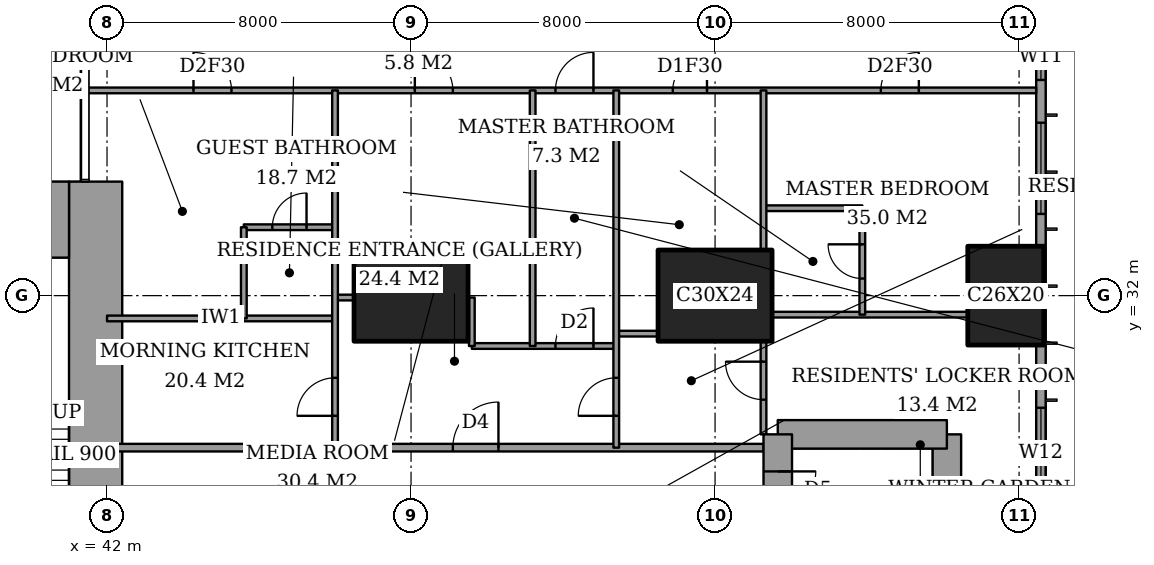
"""IFC4 building model, lengths in metres.
Left out: names, types, materials, properties, quantities, classifications, styles, units other than length and angle.
Written with IfcOpenShell. Run it as: python <this file> out.ifc"""

import sys

from ifc_helpers import new_model, si_unit, direction, frame, frame_2d, origin, origin_2d, place, context, subcontext, project, spatial, rectangle, extrude, element, fill, save


model = new_model("IFC4")
c1 = context("Model", 3, precision=1e-05, world=origin(), true_north=direction((0.0, 1.0)))
c2 = subcontext(c1, "Body", "Model", "MODEL_VIEW")
j1 = project(units=[si_unit("LENGTHUNIT", "METRE"), si_unit("PLANEANGLEUNIT", "RADIAN")], contexts=[c1])
p1 = place(None, origin())
s1 = spatial("IfcSite", under=j1, at=p1, CompositionType="ELEMENT")
p2 = place(p1, origin())
s2 = spatial("IfcBuilding", under=s1, at=p2, CompositionType="ELEMENT")
p3 = place(p2, frame((0.0, 0.0, 139.4)))
s3 = spatial("IfcBuildingStorey", under=s2, at=p3, CompositionType="ELEMENT", Elevation=139.4)
for number, where, z_axis, x_axis in (
    (1, (50.0, 32.0, 0.0), (0.0, 0.0, 1.0), (1.0, 0.0, 0.0)),
    (2, (58.0, 32.0, 0.0), (0.0, 0.0, 1.0), (1.0, 0.0, 0.0)),
):
    element("IfcColumn", number, at=place(p3, frame(where, z_axis=z_axis, x_axis=x_axis)), inside=s3, PredefinedType="COLUMN", context=c2, shape_type="SweptSolid", body=[
        extrude(rectangle(XDim=3.0, YDim=2.4, at=origin_2d()), origin(), (0.0, 0.0, 1.0), 3.6),
    ])
p4 = place(p3, frame((65.65, 32.0, 0.0), z_axis=(0.0, 0.0, 1.0), x_axis=(0.0, 1.0, 0.0)))
e3 = element("IfcColumn", 3, at=p4, inside=s3, PredefinedType="COLUMN", context=c2, shape_type="SweptSolid", body=[
    extrude(rectangle(XDim=2.6, YDim=2.0, at=origin_2d()), origin(), (0.0, 0.0, 1.0), 3.6),
])
p5 = place(p3, frame((37.85, 34.0, 0.0), z_axis=(0.0, 0.0, 1.0), x_axis=(1.0, 0.0, 0.0)))
e4 = element("IfcWall", 4, at=p5, inside=s3, PredefinedType="SHEAR", context=c2, shape_type="SweptSolid", body=[
    extrude(rectangle(XDim=3.15, YDim=2.0, at=frame_2d((1.575, 0.0))), origin(), (0.0, 0.0, 1.0), 3.6),
])
p6 = place(p3, frame((41.7, 24.85, 0.0), z_axis=(0.0, 0.0, 1.0), x_axis=(0.0, 1.0, 0.0)))
e5 = element("IfcWall", 5, at=p6, inside=s3, PredefinedType="SHEAR", context=c2, shape_type="SweptSolid", body=[
    extrude(rectangle(XDim=10.15, YDim=1.4, at=frame_2d((5.075, 0.0))), origin(), (0.0, 0.0, 1.0), 3.6),
])
p7 = place(p3, frame((64.1, 19.65, 0.0), z_axis=(0.0, 0.0, 1.0), x_axis=(0.0, 1.0, 0.0)))
e6 = element("IfcWall", 6, at=p7, inside=s3, PredefinedType="SHEAR", context=c2, shape_type="SweptSolid", body=[
    extrude(rectangle(XDim=8.7, YDim=0.75, at=frame_2d((4.35, 0.0))), origin(), (0.0, 0.0, 1.0), 3.6),
])
p8 = place(p3, frame((64.1, 28.35, 0.0), z_axis=(0.0, 0.0, 1.0), x_axis=(-1.0, 0.0, 0.0)))
e7 = element("IfcWall", 7, at=p8, inside=s3, PredefinedType="SHEAR", context=c2, shape_type="SweptSolid", body=[
    extrude(rectangle(XDim=4.45, YDim=0.75, at=frame_2d((2.225, 0.0))), origin(), (0.0, 0.0, 1.0), 3.6),
])
p9 = place(p3, frame((59.65, 28.35, 0.0), z_axis=(0.0, 0.0, 1.0), x_axis=(0.0, -1.0, 0.0)))
e8 = element("IfcWall", 8, at=p9, inside=s3, PredefinedType="SHEAR", context=c2, shape_type="SweptSolid", body=[
    extrude(rectangle(XDim=8.7, YDim=0.75, at=frame_2d((4.35, 0.0))), origin(), (0.0, 0.0, 1.0), 3.6),
])
p10 = place(p9, frame((0.975, 0.0, 0.0)))
e9 = element("IfcOpeningElement", 9, at=p10, cuts=e8, PredefinedType="OPENING", context=c2, shape_type="SweptSolid", body=[
    extrude(rectangle(XDim=1.0, YDim=2.1, at=frame_2d((0.5, 1.05))), frame((0.0, 0.385, 0.0), z_axis=(0.0, -1.0, 0.0), x_axis=(1.0, 0.0, 0.0)), (0.0, 0.0, 1.0), 0.77),
])
p11 = place(p3, frame((66.575, 3.175, 0.0), z_axis=(0.0, 0.0, 1.0), x_axis=(0.0, 1.0, 0.0)))
e10 = element("IfcWall", 10, at=p11, inside=s3, PredefinedType="SOLIDWALL", context=c2, shape_type="SweptSolid", body=[
    extrude(rectangle(XDim=41.65, YDim=0.25, at=frame_2d((20.825, 0.0))), origin(), (0.0, 0.0, 1.0), 3.6),
])
p12 = place(p11, frame((0.775, 0.0, 0.4)))
e11 = element("IfcOpeningElement", 11, at=p12, cuts=e10, PredefinedType="OPENING", context=c2, shape_type="SweptSolid", body=[
    extrude(rectangle(XDim=2.4, YDim=2.2, at=frame_2d((1.2, 1.1))), frame((0.0, 0.135, 0.0), z_axis=(0.0, -1.0, 0.0), x_axis=(1.0, 0.0, 0.0)), (0.0, 0.0, 1.0), 0.27),
])
p13 = place(p11, frame((6.1, 0.0, 0.4)))
e12 = element("IfcOpeningElement", 12, at=p13, cuts=e10, PredefinedType="OPENING", context=c2, shape_type="SweptSolid", body=[
    extrude(rectangle(XDim=1.2, YDim=2.2, at=frame_2d((0.6, 1.1))), frame((0.0, 0.135, 0.0), z_axis=(0.0, -1.0, 0.0), x_axis=(1.0, 0.0, 0.0)), (0.0, 0.0, 1.0), 0.27),
])
p14 = place(p11, frame((8.275, 0.0, 0.4)))
e13 = element("IfcOpeningElement", 13, at=p14, cuts=e10, PredefinedType="OPENING", context=c2, shape_type="SweptSolid", body=[
    extrude(rectangle(XDim=2.4, YDim=2.2, at=frame_2d((1.2, 1.1))), frame((0.0, 0.135, 0.0), z_axis=(0.0, -1.0, 0.0), x_axis=(1.0, 0.0, 0.0)), (0.0, 0.0, 1.0), 0.27),
])
p15 = place(p11, frame((15.775, 0.0, 0.4)))
e14 = element("IfcOpeningElement", 14, at=p15, cuts=e10, PredefinedType="OPENING", context=c2, shape_type="SweptSolid", body=[
    extrude(rectangle(XDim=2.4, YDim=2.2, at=frame_2d((1.2, 1.1))), frame((0.0, 0.135, 0.0), z_axis=(0.0, -1.0, 0.0), x_axis=(1.0, 0.0, 0.0)), (0.0, 0.0, 1.0), 0.27),
])
p16 = place(p11, frame((23.475, 0.0, 0.4)))
e15 = element("IfcOpeningElement", 15, at=p16, cuts=e10, PredefinedType="OPENING", context=c2, shape_type="SweptSolid", body=[
    extrude(rectangle(XDim=2.4, YDim=2.2, at=frame_2d((1.2, 1.1))), frame((0.0, 0.135, 0.0), z_axis=(0.0, -1.0, 0.0), x_axis=(1.0, 0.0, 0.0)), (0.0, 0.0, 1.0), 0.27),
])
p17 = place(p11, frame((30.975, 0.0, 0.4)))
e16 = element("IfcOpeningElement", 16, at=p17, cuts=e10, PredefinedType="OPENING", context=c2, shape_type="SweptSolid", body=[
    extrude(rectangle(XDim=2.4, YDim=2.2, at=frame_2d((1.2, 1.1))), frame((0.0, 0.135, 0.0), z_axis=(0.0, -1.0, 0.0), x_axis=(1.0, 0.0, 0.0)), (0.0, 0.0, 1.0), 0.27),
])
p18 = place(p11, frame((34.5, 0.0, 0.4)))
e17 = element("IfcOpeningElement", 17, at=p18, cuts=e10, PredefinedType="OPENING", context=c2, shape_type="SweptSolid", body=[
    extrude(rectangle(XDim=1.2, YDim=2.2, at=frame_2d((0.6, 1.1))), frame((0.0, 0.135, 0.0), z_axis=(0.0, -1.0, 0.0), x_axis=(1.0, 0.0, 0.0)), (0.0, 0.0, 1.0), 0.27),
])
p19 = place(p11, frame((38.475, 0.0, 0.4)))
e18 = element("IfcOpeningElement", 18, at=p19, cuts=e10, PredefinedType="OPENING", context=c2, shape_type="SweptSolid", body=[
    extrude(rectangle(XDim=2.4, YDim=2.2, at=frame_2d((1.2, 1.1))), frame((0.0, 0.135, 0.0), z_axis=(0.0, -1.0, 0.0), x_axis=(1.0, 0.0, 0.0)), (0.0, 0.0, 1.0), 0.27),
])
p20 = place(p3, frame((42.0, 28.0, 0.0), z_axis=(0.0, 0.0, 1.0), x_axis=(1.0, 0.0, 0.0)))
e19 = element("IfcWall", 19, at=p20, inside=s3, PredefinedType="PARTITIONING", context=c2, shape_type="SweptSolid", body=[
    extrude(rectangle(XDim=17.275, YDim=0.2, at=frame_2d((8.637, 0.0))), origin(), (0.0, 0.0, 1.0), 3.35),
])
p21 = place(p20, frame((9.1, 0.0, 0.0)))
e20 = element("IfcOpeningElement", 20, at=p21, cuts=e19, PredefinedType="OPENING", context=c2, shape_type="SweptSolid", body=[
    extrude(rectangle(XDim=1.2, YDim=2.4, at=frame_2d((0.6, 1.2))), frame((0.0, 0.11, 0.0), z_axis=(0.0, -1.0, 0.0), x_axis=(1.0, 0.0, 0.0)), (0.0, 0.0, 1.0), 0.22),
])
p22 = place(p3, frame((51.6, 30.675, 0.0), z_axis=(0.0, 0.0, 1.0), x_axis=(1.0, 0.0, 0.0)))
e21 = element("IfcWall", 21, at=p22, inside=s3, PredefinedType="PARTITIONING", context=c2, shape_type="SweptSolid", body=[
    extrude(rectangle(XDim=3.8, YDim=0.15, at=frame_2d((1.9, 0.0))), origin(), (0.0, 0.0, 1.0), 3.35),
])
p23 = place(p22, frame((2.2, 0.0, 0.0)))
e22 = element("IfcOpeningElement", 22, at=p23, cuts=e21, PredefinedType="OPENING", context=c2, shape_type="SweptSolid", body=[
    extrude(rectangle(XDim=1.0, YDim=2.1, at=frame_2d((0.5, 1.05))), frame((0.0, 0.085, 0.0), z_axis=(0.0, -1.0, 0.0), x_axis=(1.0, 0.0, 0.0)), (0.0, 0.0, 1.0), 0.17),
])
p24 = place(p3, frame((55.4, 31.0, 0.0), z_axis=(0.0, 0.0, 1.0), x_axis=(1.0, 0.0, 0.0)))
e23 = element("IfcWall", 23, at=p24, inside=s3, PredefinedType="PARTITIONING", context=c2, shape_type="SweptSolid", body=[
    extrude(rectangle(XDim=1.1, YDim=0.15, at=frame_2d((0.55, 0.0))), origin(), (0.0, 0.0, 1.0), 3.35),
])
p25 = place(p3, frame((42.0, 31.4, 0.0), z_axis=(0.0, 0.0, 1.0), x_axis=(1.0, 0.0, 0.0)))
e24 = element("IfcWall", 24, at=p25, inside=s3, PredefinedType="PARTITIONING", context=c2, shape_type="SweptSolid", body=[
    extrude(rectangle(XDim=6.0, YDim=0.15, at=frame_2d((3.0, 0.0))), origin(), (0.0, 0.0, 1.0), 3.35),
])
p26 = place(p3, frame((59.5, 31.5, 0.0), z_axis=(0.0, 0.0, 1.0), x_axis=(1.0, 0.0, 0.0)))
e25 = element("IfcWall", 25, at=p26, inside=s3, PredefinedType="PARTITIONING", context=c2, shape_type="SweptSolid", body=[
    extrude(rectangle(XDim=5.15, YDim=0.15, at=frame_2d((2.575, 0.0))), origin(), (0.0, 0.0, 1.0), 3.35),
])
p27 = place(p3, frame((48.0, 31.95, 0.0), z_axis=(0.0, 0.0, 1.0), x_axis=(1.0, 0.0, 0.0)))
e26 = element("IfcWall", 26, at=p27, inside=s3, PredefinedType="PARTITIONING", context=c2, shape_type="SweptSolid", body=[
    extrude(rectangle(XDim=0.5, YDim=0.15, at=frame_2d((0.25, 0.0))), origin(), (0.0, 0.0, 1.0), 2.634),
])
p28 = place(p3, frame((45.6, 33.8, 0.0), z_axis=(0.0, 0.0, 1.0), x_axis=(1.0, 0.0, 0.0)))
e27 = element("IfcWall", 27, at=p28, inside=s3, PredefinedType="PARTITIONING", context=c2, shape_type="SweptSolid", body=[
    extrude(rectangle(XDim=2.4, YDim=0.15, at=frame_2d((1.2, 0.0))), origin(), (0.0, 0.0, 1.0), 3.35),
])
p29 = place(p28, frame((0.75, 0.0, 0.0)))
e28 = element("IfcOpeningElement", 28, at=p29, cuts=e27, PredefinedType="OPENING", context=c2, shape_type="SweptSolid", body=[
    extrude(rectangle(XDim=0.9, YDim=2.1, at=frame_2d((0.45, 1.05))), frame((0.0, 0.085, 0.0), z_axis=(0.0, -1.0, 0.0), x_axis=(1.0, 0.0, 0.0)), (0.0, 0.0, 1.0), 0.17),
])
p30 = place(p3, frame((59.275, 34.3, 0.0), z_axis=(0.0, 0.0, 1.0), x_axis=(1.0, 0.0, 0.0)))
e29 = element("IfcWall", 29, at=p30, inside=s3, PredefinedType="PARTITIONING", context=c2, shape_type="SweptSolid", body=[
    extrude(rectangle(XDim=2.6, YDim=0.15, at=frame_2d((1.3, 0.0))), origin(), (0.0, 0.0, 1.0), 3.35),
])
p31 = place(p3, frame((41.439, 37.4, 0.0), z_axis=(0.0, 0.0, 1.0), x_axis=(1.0, 0.0, 0.0)))
e30 = element("IfcWall", 30, at=p31, inside=s3, PredefinedType="PARTITIONING", context=c2, shape_type="SweptSolid", body=[
    extrude(rectangle(XDim=25.011, YDim=0.15, at=frame_2d((12.505, 0.0))), origin(), (0.0, 0.0, 1.0), 3.35),
])
p32 = place(p31, frame((12.361, 0.0, 0.0)))
e31 = element("IfcOpeningElement", 31, at=p32, cuts=e30, PredefinedType="OPENING", context=c2, shape_type="SweptSolid", body=[
    extrude(rectangle(XDim=1.0, YDim=2.1, at=frame_2d((0.5, 1.05))), frame((0.0, 0.085, 0.0), z_axis=(0.0, -1.0, 0.0), x_axis=(1.0, 0.0, 0.0)), (0.0, 0.0, 1.0), 0.17),
])
p33 = place(p31, frame((20.924, 0.0, 0.0)))
e32 = element("IfcOpeningElement", 32, at=p33, cuts=e30, PredefinedType="OPENING", context=c2, shape_type="SweptSolid", body=[
    extrude(rectangle(XDim=1.0, YDim=2.1, at=frame_2d((0.5, 1.05))), frame((0.0, 0.085, 0.0), z_axis=(0.0, -1.0, 0.0), x_axis=(1.0, 0.0, 0.0)), (0.0, 0.0, 1.0), 0.17),
])
p34 = place(p31, frame((15.448, 0.0, 0.0)))
e33 = element("IfcOpeningElement", 33, at=p34, cuts=e30, PredefinedType="OPENING", context=c2, shape_type="SweptSolid", body=[
    extrude(rectangle(XDim=0.9, YDim=2.1, at=frame_2d((0.45, 1.05))), frame((0.0, 0.085, 0.0), z_axis=(0.0, -1.0, 0.0), x_axis=(1.0, 0.0, 0.0)), (0.0, 0.0, 1.0), 0.17),
])
p35 = place(p31, frame((8.661, 0.0, 0.0)))
e34 = element("IfcOpeningElement", 34, at=p35, cuts=e30, PredefinedType="OPENING", context=c2, shape_type="SweptSolid", body=[
    extrude(rectangle(XDim=1.0, YDim=2.1, at=frame_2d((0.5, 1.05))), frame((0.0, 0.085, 0.0), z_axis=(0.0, -1.0, 0.0), x_axis=(1.0, 0.0, 0.0)), (0.0, 0.0, 1.0), 0.17),
])
p36 = place(p31, frame((2.836, 0.0, 0.0)))
e35 = element("IfcOpeningElement", 35, at=p36, cuts=e30, PredefinedType="OPENING", context=c2, shape_type="SweptSolid", body=[
    extrude(rectangle(XDim=1.0, YDim=2.1, at=frame_2d((0.5, 1.05))), frame((0.0, 0.085, 0.0), z_axis=(0.0, -1.0, 0.0), x_axis=(1.0, 0.0, 0.0)), (0.0, 0.0, 1.0), 0.17),
])
p37 = place(p3, frame((45.6, 31.4, 0.0), z_axis=(0.0, 0.0, 1.0), x_axis=(0.0, 1.0, 0.0)))
e36 = element("IfcWall", 36, at=p37, inside=s3, PredefinedType="PARTITIONING", context=c2, shape_type="SweptSolid", body=[
    extrude(rectangle(XDim=2.4, YDim=0.15, at=frame_2d((1.2, 0.0))), origin(), (0.0, 0.0, 1.0), 3.35),
])
p38 = place(p3, frame((48.0, 28.0, 0.0), z_axis=(0.0, 0.0, 1.0), x_axis=(0.0, 1.0, 0.0)))
e37 = element("IfcWall", 37, at=p38, inside=s3, PredefinedType="PARTITIONING", context=c2, shape_type="SweptSolid", body=[
    extrude(rectangle(XDim=9.4, YDim=0.15, at=frame_2d((4.7, 0.0))), origin(), (0.0, 0.0, 1.0), 3.35),
])
p39 = place(p38, frame((0.837, 0.0, 0.0)))
e38 = element("IfcOpeningElement", 38, at=p39, cuts=e37, PredefinedType="OPENING", context=c2, shape_type="SweptSolid", body=[
    extrude(rectangle(XDim=1.0, YDim=2.1, at=frame_2d((0.5, 1.05))), frame((0.0, 0.085, 0.0), z_axis=(0.0, -1.0, 0.0), x_axis=(1.0, 0.0, 0.0)), (0.0, 0.0, 1.0), 0.17),
])
p40 = place(p3, frame((51.6, 30.675, 0.0), z_axis=(0.0, 0.0, 1.0), x_axis=(0.0, 1.0, 0.0)))
e39 = element("IfcWall", 39, at=p40, inside=s3, PredefinedType="PARTITIONING", context=c2, shape_type="SweptSolid", body=[
    extrude(rectangle(XDim=1.275, YDim=0.15, at=frame_2d((0.637, 0.0))), origin(), (0.0, 0.0, 1.0), 3.35),
])
p41 = place(p3, frame((53.2, 30.675, 0.0), z_axis=(0.0, 0.0, 1.0), x_axis=(0.0, 1.0, 0.0)))
e40 = element("IfcWall", 40, at=p41, inside=s3, PredefinedType="PARTITIONING", context=c2, shape_type="SweptSolid", body=[
    extrude(rectangle(XDim=6.725, YDim=0.15, at=frame_2d((3.362, 0.0))), origin(), (0.0, 0.0, 1.0), 3.35),
])
p42 = place(p3, frame((55.4, 28.0, 0.0), z_axis=(0.0, 0.0, 1.0), x_axis=(0.0, 1.0, 0.0)))
e41 = element("IfcWall", 41, at=p42, inside=s3, PredefinedType="PARTITIONING", context=c2, shape_type="SweptSolid", body=[
    extrude(rectangle(XDim=9.4, YDim=0.15, at=frame_2d((4.7, 0.0))), origin(), (0.0, 0.0, 1.0), 3.35),
])
p43 = place(p42, frame((0.837, 0.0, 0.0)))
e42 = element("IfcOpeningElement", 42, at=p43, cuts=e41, PredefinedType="OPENING", context=c2, shape_type="SweptSolid", body=[
    extrude(rectangle(XDim=1.0, YDim=2.1, at=frame_2d((0.5, 1.05))), frame((0.0, 0.085, 0.0), z_axis=(0.0, -1.0, 0.0), x_axis=(1.0, 0.0, 0.0)), (0.0, 0.0, 1.0), 0.17),
])
p44 = place(p3, frame((59.275, 28.35, 0.0), z_axis=(0.0, 0.0, 1.0), x_axis=(0.0, 1.0, 0.0)))
e43 = element("IfcWall", 43, at=p44, inside=s3, PredefinedType="PARTITIONING", context=c2, shape_type="SweptSolid", body=[
    extrude(rectangle(XDim=2.45, YDim=0.15, at=frame_2d((1.225, 0.0))), origin(), (0.0, 0.0, 1.0), 3.35),
])
p45 = place(p44, frame((0.913, 0.0, 0.0)))
e44 = element("IfcOpeningElement", 44, at=p45, cuts=e43, PredefinedType="OPENING", context=c2, shape_type="SweptSolid", body=[
    extrude(rectangle(XDim=1.0, YDim=2.1, at=frame_2d((0.5, 1.05))), frame((0.0, 0.085, 0.0), z_axis=(0.0, -1.0, 0.0), x_axis=(1.0, 0.0, 0.0)), (0.0, 0.0, 1.0), 0.17),
])
p46 = place(p3, frame((59.275, 33.2, 0.0), z_axis=(0.0, 0.0, 1.0), x_axis=(0.0, 1.0, 0.0)))
e45 = element("IfcWall", 45, at=p46, inside=s3, PredefinedType="PARTITIONING", context=c2, shape_type="SweptSolid", body=[
    extrude(rectangle(XDim=4.2, YDim=0.15, at=frame_2d((2.1, 0.0))), origin(), (0.0, 0.0, 1.0), 3.35),
])
p47 = place(p3, frame((61.875, 31.5, 0.0), z_axis=(0.0, 0.0, 1.0), x_axis=(0.0, 1.0, 0.0)))
e46 = element("IfcWall", 46, at=p47, inside=s3, PredefinedType="PARTITIONING", context=c2, shape_type="SweptSolid", body=[
    extrude(rectangle(XDim=2.8, YDim=0.15, at=frame_2d((1.4, 0.0))), origin(), (0.0, 0.0, 1.0), 3.35),
])
p48 = place(p47, frame((0.95, 0.0, 0.0)))
e47 = element("IfcOpeningElement", 47, at=p48, cuts=e46, PredefinedType="OPENING", context=c2, shape_type="SweptSolid", body=[
    extrude(rectangle(XDim=0.9, YDim=2.1, at=frame_2d((0.45, 1.05))), frame((0.0, 0.085, 0.0), z_axis=(0.0, -1.0, 0.0), x_axis=(1.0, 0.0, 0.0)), (0.0, 0.0, 1.0), 0.17),
])
p49 = place(p16, origin())
e48 = element("IfcWindow", 48, at=p49, inside=s3, PartitioningType="SINGLE_PANEL", PredefinedType="WINDOW", context=c2, shape_type="SweptSolid", body=[
    extrude(rectangle(XDim=2.4, YDim=2.2, at=frame_2d((1.2, 1.1))), frame((0.0, 0.03, 0.0), z_axis=(0.0, -1.0, 0.0), x_axis=(1.0, 0.0, 0.0)), (0.0, 0.0, 1.0), 0.06),
])
fill(e15, e48)
p50 = place(p17, origin())
e49 = element("IfcWindow", 49, at=p50, inside=s3, PartitioningType="SINGLE_PANEL", PredefinedType="WINDOW", context=c2, shape_type="SweptSolid", body=[
    extrude(rectangle(XDim=2.4, YDim=2.2, at=frame_2d((1.2, 1.1))), frame((0.0, 0.03, 0.0), z_axis=(0.0, -1.0, 0.0), x_axis=(1.0, 0.0, 0.0)), (0.0, 0.0, 1.0), 0.06),
])
fill(e16, e49)
p51 = place(p18, origin())
e50 = element("IfcWindow", 50, at=p51, inside=s3, PartitioningType="SINGLE_PANEL", PredefinedType="WINDOW", context=c2, shape_type="SweptSolid", body=[
    extrude(rectangle(XDim=1.2, YDim=2.2, at=frame_2d((0.6, 1.1))), frame((0.0, 0.03, 0.0), z_axis=(0.0, -1.0, 0.0), x_axis=(1.0, 0.0, 0.0)), (0.0, 0.0, 1.0), 0.06),
])
fill(e17, e50)
p52 = place(p32, origin())
e51 = element("IfcDoor", 51, at=p52, inside=s3, OperationType="SINGLE_SWING_LEFT", PredefinedType="DOOR", context=c2, shape_type="SweptSolid", body=[
    extrude(rectangle(XDim=1.0, YDim=2.1, at=frame_2d((0.5, 1.05))), frame((0.0, 0.025, 0.0), z_axis=(0.0, -1.0, 0.0), x_axis=(1.0, 0.0, 0.0)), (0.0, 0.0, 1.0), 0.05),
])
fill(e31, e51)
p53 = place(p48, origin())
e52 = element("IfcDoor", 52, at=p53, inside=s3, OperationType="SINGLE_SWING_LEFT", PredefinedType="DOOR", context=c2, shape_type="SweptSolid", body=[
    extrude(rectangle(XDim=0.9, YDim=2.1, at=frame_2d((0.45, 1.05))), frame((0.0, 0.025, 0.0), z_axis=(0.0, -1.0, 0.0), x_axis=(1.0, 0.0, 0.0)), (0.0, 0.0, 1.0), 0.05),
])
fill(e47, e52)
p54 = place(p33, origin())
e53 = element("IfcDoor", 53, at=p54, inside=s3, OperationType="SINGLE_SWING_LEFT", PredefinedType="DOOR", context=c2, shape_type="SweptSolid", body=[
    extrude(rectangle(XDim=1.0, YDim=2.1, at=frame_2d((0.5, 1.05))), frame((0.0, 0.025, 0.0), z_axis=(0.0, -1.0, 0.0), x_axis=(1.0, 0.0, 0.0)), (0.0, 0.0, 1.0), 0.05),
])
fill(e32, e53)
p55 = place(p45, origin())
e54 = element("IfcDoor", 54, at=p55, inside=s3, OperationType="SINGLE_SWING_LEFT", PredefinedType="DOOR", context=c2, shape_type="SweptSolid", body=[
    extrude(rectangle(XDim=1.0, YDim=2.1, at=frame_2d((0.5, 1.05))), frame((0.0, 0.025, 0.0), z_axis=(0.0, -1.0, 0.0), x_axis=(1.0, 0.0, 0.0)), (0.0, 0.0, 1.0), 0.05),
])
fill(e44, e54)
p56 = place(p34, origin())
e55 = element("IfcDoor", 55, at=p56, inside=s3, OperationType="SINGLE_SWING_LEFT", PredefinedType="DOOR", context=c2, shape_type="SweptSolid", body=[
    extrude(rectangle(XDim=0.9, YDim=2.1, at=frame_2d((0.45, 1.05))), frame((0.0, 0.025, 0.0), z_axis=(0.0, -1.0, 0.0), x_axis=(1.0, 0.0, 0.0)), (0.0, 0.0, 1.0), 0.05),
])
fill(e33, e55)
p57 = place(p43, origin())
e56 = element("IfcDoor", 56, at=p57, inside=s3, OperationType="SINGLE_SWING_RIGHT", PredefinedType="DOOR", context=c2, shape_type="SweptSolid", body=[
    extrude(rectangle(XDim=1.0, YDim=2.1, at=frame_2d((0.5, 1.05))), frame((0.0, 0.025, 0.0), z_axis=(0.0, -1.0, 0.0), x_axis=(1.0, 0.0, 0.0)), (0.0, 0.0, 1.0), 0.05),
])
fill(e42, e56)
p58 = place(p21, origin())
e57 = element("IfcDoor", 57, at=p58, inside=s3, OperationType="SINGLE_SWING_LEFT", PredefinedType="DOOR", context=c2, shape_type="SweptSolid", body=[
    extrude(rectangle(XDim=1.2, YDim=2.4, at=frame_2d((0.6, 1.2))), frame((0.0, 0.025, 0.0), z_axis=(0.0, -1.0, 0.0), x_axis=(1.0, 0.0, 0.0)), (0.0, 0.0, 1.0), 0.05),
])
fill(e20, e57)
p59 = place(p23, origin())
e58 = element("IfcDoor", 58, at=p59, inside=s3, OperationType="SINGLE_SWING_LEFT", PredefinedType="DOOR", context=c2, shape_type="SweptSolid", body=[
    extrude(rectangle(XDim=1.0, YDim=2.1, at=frame_2d((0.5, 1.05))), frame((0.0, 0.025, 0.0), z_axis=(0.0, -1.0, 0.0), x_axis=(1.0, 0.0, 0.0)), (0.0, 0.0, 1.0), 0.05),
])
fill(e22, e58)
p60 = place(p35, origin())
e59 = element("IfcDoor", 59, at=p60, inside=s3, OperationType="SINGLE_SWING_RIGHT", PredefinedType="DOOR", context=c2, shape_type="SweptSolid", body=[
    extrude(rectangle(XDim=1.0, YDim=2.1, at=frame_2d((0.5, 1.05))), frame((0.0, 0.025, 0.0), z_axis=(0.0, -1.0, 0.0), x_axis=(1.0, 0.0, 0.0)), (0.0, 0.0, 1.0), 0.05),
])
fill(e34, e59)
p61 = place(p29, origin())
e60 = element("IfcDoor", 60, at=p61, inside=s3, OperationType="SINGLE_SWING_LEFT", PredefinedType="DOOR", context=c2, shape_type="SweptSolid", body=[
    extrude(rectangle(XDim=0.9, YDim=2.1, at=frame_2d((0.45, 1.05))), frame((0.0, 0.025, 0.0), z_axis=(0.0, -1.0, 0.0), x_axis=(1.0, 0.0, 0.0)), (0.0, 0.0, 1.0), 0.05),
])
fill(e28, e60)
p62 = place(p36, origin())
e61 = element("IfcDoor", 61, at=p62, inside=s3, OperationType="SINGLE_SWING_RIGHT", PredefinedType="DOOR", context=c2, shape_type="SweptSolid", body=[
    extrude(rectangle(XDim=1.0, YDim=2.1, at=frame_2d((0.5, 1.05))), frame((0.0, 0.025, 0.0), z_axis=(0.0, -1.0, 0.0), x_axis=(1.0, 0.0, 0.0)), (0.0, 0.0, 1.0), 0.05),
])
fill(e35, e61)
p63 = place(p39, origin())
e62 = element("IfcDoor", 62, at=p63, inside=s3, OperationType="SINGLE_SWING_RIGHT", PredefinedType="DOOR", context=c2, shape_type="SweptSolid", body=[
    extrude(rectangle(XDim=1.0, YDim=2.1, at=frame_2d((0.5, 1.05))), frame((0.0, 0.025, 0.0), z_axis=(0.0, -1.0, 0.0), x_axis=(1.0, 0.0, 0.0)), (0.0, 0.0, 1.0), 0.05),
])
fill(e38, e62)
p64 = place(p10, origin())
e63 = element("IfcDoor", 63, at=p64, inside=s3, OperationType="SINGLE_SWING_RIGHT", PredefinedType="DOOR", context=c2, shape_type="SweptSolid", body=[
    extrude(rectangle(XDim=1.0, YDim=2.1, at=frame_2d((0.5, 1.05))), frame((0.0, 0.025, 0.0), z_axis=(0.0, -1.0, 0.0), x_axis=(1.0, 0.0, 0.0)), (0.0, 0.0, 1.0), 0.05),
])
fill(e9, e63)
save(model, sys.argv[1])
